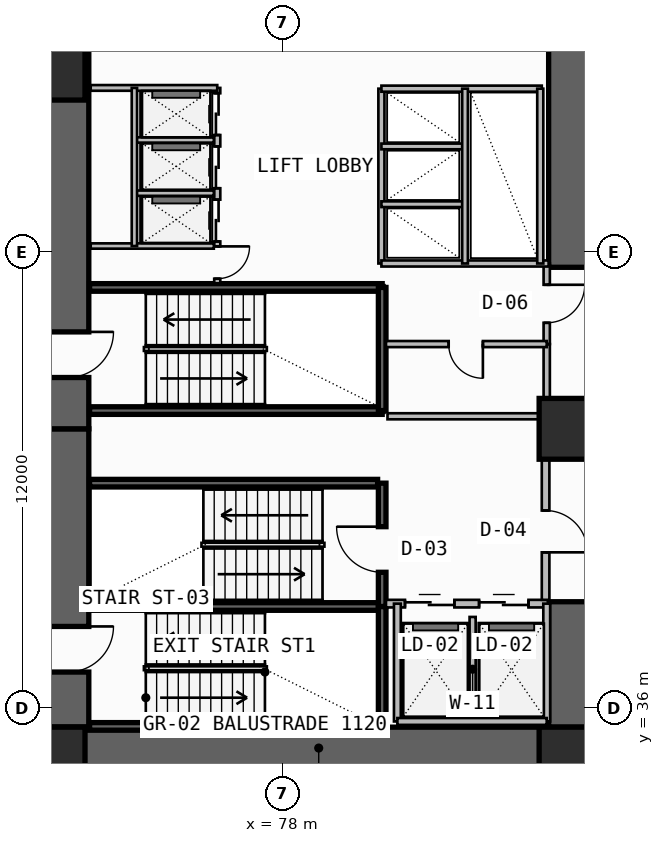
"""IFC4 building model, lengths in metres.
Left out: names, types, materials, properties, quantities, classifications, styles, units other than length and angle.
Written with IfcOpenShell. Run it as: python <this file> out.ifc"""

import sys

from ifc_helpers import new_model, si_unit, direction, frame, frame_2d, origin, origin_2d, place, context, subcontext, project, spatial, rectangle, extrude, element, fill, save


model = new_model("IFC4")
c1 = context("Model", 3, precision=1e-05, world=origin(), true_north=direction((0.0, 1.0)))
c2 = subcontext(c1, "Body", "Model", "MODEL_VIEW")
j1 = project(units=[si_unit("LENGTHUNIT", "METRE"), si_unit("PLANEANGLEUNIT", "RADIAN")], contexts=[c1])
p1 = place(None, origin())
s1 = spatial("IfcSite", under=j1, at=p1, CompositionType="ELEMENT")
p2 = place(p1, origin())
s2 = spatial("IfcBuilding", under=s1, at=p2, CompositionType="ELEMENT")
p3 = place(p2, frame((0.0, 0.0, 13.2)))
s3 = spatial("IfcBuildingStorey", under=s2, at=p3, CompositionType="ELEMENT", Elevation=13.2)
p4 = place(p3, frame((72.35, 35.5, -0.32), z_axis=(0.0, 0.0, 1.0), x_axis=(0.0, 1.0, 0.0)))
e1 = element("IfcWall", 1, at=p4, inside=s3, PredefinedType="SHEAR", context=c2, shape_type="SweptSolid", body=[
    extrude(rectangle(XDim=7.85, YDim=1.1, at=frame_2d((3.925, 0.0))), origin(), (0.0, 0.0, 1.0), 4.2),
])
p5 = place(p4, frame((1.45, 0.0, 0.32)))
e2 = element("IfcOpeningElement", 2, at=p5, cuts=e1, PredefinedType="OPENING", context=c2, shape_type="SweptSolid", body=[
    extrude(rectangle(XDim=1.2, YDim=2.2, at=frame_2d((0.6, 1.1))), frame((0.0, 0.56, 0.0), z_axis=(0.0, -1.0, 0.0), x_axis=(1.0, 0.0, 0.0)), (0.0, 0.0, 1.0), 1.12),
])
p6 = place(p3, frame((71.8, 34.95, -0.32), z_axis=(0.0, 0.0, 1.0), x_axis=(1.0, 0.0, 0.0)))
e3 = element("IfcWall", 3, at=p6, inside=s3, PredefinedType="SHEAR", context=c2, shape_type="SweptSolid", body=[
    extrude(rectangle(XDim=14.3, YDim=1.1, at=frame_2d((7.15, 0.0))), origin(), (0.0, 0.0, 1.0), 4.2),
])
p7 = place(p3, frame((85.55, 35.5, -0.32), z_axis=(0.0, 0.0, 1.0), x_axis=(0.0, 1.0, 0.0)))
e4 = element("IfcWall", 4, at=p7, inside=s3, PredefinedType="SHEAR", context=c2, shape_type="SweptSolid", body=[
    extrude(rectangle(XDim=3.3, YDim=1.1, at=frame_2d((1.65, 0.0))), origin(), (0.0, 0.0, 1.0), 4.2),
])
p8 = place(p3, frame((72.35, 43.35, -0.32), z_axis=(0.0, 0.0, 1.0), x_axis=(0.0, 1.0, 0.0)))
e5 = element("IfcWall", 5, at=p8, inside=s3, PredefinedType="SHEAR", context=c2, shape_type="SweptSolid", body=[
    extrude(rectangle(XDim=12.7, YDim=1.1, at=frame_2d((6.35, 0.0))), origin(), (0.0, 0.0, 1.0), 4.2),
])
p9 = place(p8, frame((1.35, 0.0, 0.32)))
e6 = element("IfcOpeningElement", 6, at=p9, cuts=e5, PredefinedType="OPENING", context=c2, shape_type="SweptSolid", body=[
    extrude(rectangle(XDim=1.2, YDim=2.2, at=frame_2d((0.6, 1.1))), frame((0.0, 0.56, 0.0), z_axis=(0.0, -1.0, 0.0), x_axis=(1.0, 0.0, 0.0)), (0.0, 0.0, 1.0), 1.12),
])
p10 = place(p3, frame((85.55, 47.6, -0.32), z_axis=(0.0, 0.0, 1.0), x_axis=(0.0, 1.0, 0.0)))
e7 = element("IfcWall", 7, at=p10, inside=s3, PredefinedType="SHEAR", context=c2, shape_type="SweptSolid", body=[
    extrude(rectangle(XDim=8.45, YDim=1.1, at=frame_2d((4.225, 0.0))), origin(), (0.0, 0.0, 1.0), 4.2),
])
for number, where, z_axis, x_axis in (
    (8, (72.0, 34.7, 0.0), (0.0, 0.0, 1.0), (1.0, 0.0, 0.0)),
    (9, (85.55, 34.7, 0.0), (0.0, 0.0, 1.0), (1.0, 0.0, 0.0)),
    (10, (85.55, 43.35, 0.0), (0.0, 0.0, 1.0), (1.0, 0.0, 0.0)),
    (11, (72.0, 52.8, 0.0), (0.0, 0.0, 1.0), (1.0, 0.0, 0.0)),
):
    element("IfcColumn", number, at=place(p3, frame(where, z_axis=z_axis, x_axis=x_axis)), inside=s3, PredefinedType="COLUMN", context=c2, shape_type="SweptSolid", body=[
        extrude(rectangle(XDim=1.6, YDim=1.6, at=origin_2d()), origin(), (0.0, 0.0, 1.0), 4.2),
    ])
for number, where, z_axis, x_axis in (
    (12, (72.92, 35.52, -0.32), (0.0, 0.0, 1.0), (1.0, 0.0, 0.0)),
    (13, (72.92, 38.675, -0.32), (0.0, 0.0, 1.0), (1.0, 0.0, 0.0)),
):
    element("IfcWall", number, at=place(p3, frame(where, z_axis=z_axis, x_axis=x_axis)), inside=s3, PredefinedType="SOLIDWALL", context=c2, shape_type="SweptSolid", body=[
        extrude(rectangle(XDim=7.7, YDim=0.2, at=frame_2d((3.85, 0.0))), origin(), (0.0, 0.0, 1.0), 4.2),
    ])
p11 = place(p3, frame((80.62, 35.52, -0.32), z_axis=(0.0, 0.0, 1.0), x_axis=(0.0, 1.0, 0.0)))
e14 = element("IfcWall", 14, at=p11, inside=s3, PredefinedType="SOLIDWALL", context=c2, shape_type="SweptSolid", body=[
    extrude(rectangle(XDim=3.155, YDim=0.2, at=frame_2d((1.578, 0.0))), origin(), (0.0, 0.0, 1.0), 4.2),
])
p12 = place(p3, frame((80.62, 38.675, -0.32), z_axis=(0.0, 0.0, 1.0), x_axis=(0.0, 1.0, 0.0)))
e15 = element("IfcWall", 15, at=p12, inside=s3, PredefinedType="SOLIDWALL", context=c2, shape_type="SweptSolid", body=[
    extrude(rectangle(XDim=3.245, YDim=0.2, at=frame_2d((1.623, 0.0))), origin(), (0.0, 0.0, 1.0), 4.2),
])
p13 = place(p12, frame((0.9, 0.0, 0.32)))
e16 = element("IfcOpeningElement", 16, at=p13, cuts=e15, PredefinedType="OPENING", context=c2, shape_type="SweptSolid", body=[
    extrude(rectangle(XDim=1.2, YDim=2.2, at=frame_2d((0.6, 1.1))), frame((0.0, 0.11, 0.0), z_axis=(0.0, -1.0, 0.0), x_axis=(1.0, 0.0, 0.0)), (0.0, 0.0, 1.0), 0.22),
])
p14 = place(p3, frame((80.72, 38.75, 0.0), z_axis=(0.0, 0.0, 1.0), x_axis=(1.0, 0.0, 0.0)))
e17 = element("IfcWall", 17, at=p14, inside=s3, PredefinedType="SOLIDWALL", context=c2, shape_type="SweptSolid", body=[
    extrude(rectangle(XDim=4.26, YDim=0.2, at=frame_2d((2.13, 0.0))), origin(), (0.0, 0.0, 1.0), 3.88),
])
p15 = place(p14, frame((0.5, 0.0, 0.0)))
e18 = element("IfcOpeningElement", 18, at=p15, cuts=e17, PredefinedType="OPENING", context=c2, shape_type="SweptSolid", body=[
    extrude(rectangle(XDim=1.3, YDim=2.3, at=frame_2d((0.65, 1.15))), frame((0.0, 0.11, 0.0), z_axis=(0.0, -1.0, 0.0), x_axis=(1.0, 0.0, 0.0)), (0.0, 0.0, 1.0), 0.22),
])
p16 = place(p14, frame((2.45, 0.0, 0.0)))
e19 = element("IfcOpeningElement", 19, at=p16, cuts=e17, PredefinedType="OPENING", context=c2, shape_type="SweptSolid", body=[
    extrude(rectangle(XDim=1.3, YDim=2.3, at=frame_2d((0.65, 1.15))), frame((0.0, 0.11, 0.0), z_axis=(0.0, -1.0, 0.0), x_axis=(1.0, 0.0, 0.0)), (0.0, 0.0, 1.0), 0.22),
])
p17 = place(p3, frame((83.0, 35.65, 0.0), z_axis=(0.0, 0.0, 1.0), x_axis=(0.0, 1.0, 0.0)))
e20 = element("IfcWall", 20, at=p17, inside=s3, PredefinedType="PLUMBINGWALL", context=c2, shape_type="SweptSolid", body=[
    extrude(rectangle(XDim=2.75, YDim=0.16, at=frame_2d((1.375, 0.0))), origin(), (0.0, 0.0, 1.0), 3.88),
])
for number, where, z_axis, x_axis in (
    (21, (84.95, 35.65, 0.0), (0.0, 0.0, 1.0), (0.0, 1.0, 0.0)),
    (22, (81.02, 35.65, 0.0), (0.0, 0.0, 1.0), (0.0, 1.0, 0.0)),
):
    element("IfcWall", number, at=place(p3, frame(where, z_axis=z_axis, x_axis=x_axis)), inside=s3, PredefinedType="SOLIDWALL", context=c2, shape_type="SweptSolid", body=[
        extrude(rectangle(XDim=3.1, YDim=0.18, at=frame_2d((1.55, 0.0))), origin(), (0.0, 0.0, 1.0), 3.88),
    ])
p18 = place(p3, frame((81.02, 35.65, 0.0), z_axis=(0.0, 0.0, 1.0), x_axis=(1.0, 0.0, 0.0)))
e23 = element("IfcWall", 23, at=p18, inside=s3, PredefinedType="SOLIDWALL", context=c2, shape_type="SweptSolid", body=[
    extrude(rectangle(XDim=3.93, YDim=0.18, at=frame_2d((1.965, 0.0))), origin(), (0.0, 0.0, 1.0), 3.88),
])
p19 = place(p3, frame((84.92, 38.85, 0.0), z_axis=(0.0, 0.0, 1.0), x_axis=(0.0, 1.0, 0.0)))
e24 = element("IfcWall", 24, at=p19, inside=s3, PredefinedType="SOLIDWALL", context=c2, shape_type="SweptSolid", body=[
    extrude(rectangle(XDim=4.83, YDim=0.2, at=frame_2d((2.415, 0.0))), origin(), (0.0, 0.0, 1.0), 3.88),
])
p20 = place(p19, frame((1.25, 0.0, 0.0)))
e25 = element("IfcOpeningElement", 25, at=p20, cuts=e24, PredefinedType="OPENING", context=c2, shape_type="SweptSolid", body=[
    extrude(rectangle(XDim=1.1, YDim=2.2, at=frame_2d((0.55, 1.1))), frame((0.0, 0.11, 0.0), z_axis=(0.0, -1.0, 0.0), x_axis=(1.0, 0.0, 0.0)), (0.0, 0.0, 1.0), 0.22),
])
p21 = place(p3, frame((72.92, 41.92, -0.32), z_axis=(0.0, 0.0, 1.0), x_axis=(1.0, 0.0, 0.0)))
e26 = element("IfcWall", 26, at=p21, inside=s3, PredefinedType="SOLIDWALL", context=c2, shape_type="SweptSolid", body=[
    extrude(rectangle(XDim=7.58, YDim=0.2, at=frame_2d((3.79, 0.0))), origin(), (0.0, 0.0, 1.0), 4.2),
])
for number, where, z_axis, x_axis in (
    (27, (72.92, 43.83, -0.32), (0.0, 0.0, 1.0), (1.0, 0.0, 0.0)),
    (28, (72.92, 47.07, -0.32), (0.0, 0.0, 1.0), (1.0, 0.0, 0.0)),
):
    element("IfcWall", number, at=place(p3, frame(where, z_axis=z_axis, x_axis=x_axis)), inside=s3, PredefinedType="SOLIDWALL", context=c2, shape_type="SweptSolid", body=[
        extrude(rectangle(XDim=7.7, YDim=0.2, at=frame_2d((3.85, 0.0))), origin(), (0.0, 0.0, 1.0), 4.2),
    ])
p22 = place(p3, frame((80.62, 43.83, -0.32), z_axis=(0.0, 0.0, 1.0), x_axis=(0.0, 1.0, 0.0)))
e29 = element("IfcWall", 29, at=p22, inside=s3, PredefinedType="SOLIDWALL", context=c2, shape_type="SweptSolid", body=[
    extrude(rectangle(XDim=3.24, YDim=0.2, at=frame_2d((1.62, 0.0))), origin(), (0.0, 0.0, 1.0), 4.2),
])
p23 = place(p3, frame((84.95, 43.68, 0.0), z_axis=(0.0, 0.0, 1.0), x_axis=(0.0, 1.0, 0.0)))
e30 = element("IfcWall", 30, at=p23, inside=s3, PredefinedType="PLUMBINGWALL", context=c2, shape_type="SweptSolid", body=[
    extrude(rectangle(XDim=1.9, YDim=0.165, at=frame_2d((0.95, 0.0))), origin(), (0.0, 0.0, 1.0), 3.88),
])
p24 = place(p3, frame((84.95, 45.58, 0.0), z_axis=(0.0, 0.0, 1.0), x_axis=(0.0, 1.0, 0.0)))
e31 = element("IfcWall", 31, at=p24, inside=s3, PredefinedType="PARTITIONING", context=c2, shape_type="SweptSolid", body=[
    extrude(rectangle(XDim=2.12, YDim=0.165, at=frame_2d((1.06, 0.0))), origin(), (0.0, 0.0, 1.0), 3.88),
])
p25 = place(p24, frame((0.56, 0.0, 0.0)))
e32 = element("IfcOpeningElement", 32, at=p25, cuts=e31, PredefinedType="OPENING", context=c2, shape_type="SweptSolid", body=[
    extrude(rectangle(XDim=1.0, YDim=2.2, at=frame_2d((0.5, 1.1))), frame((0.0, 0.093, 0.0), z_axis=(0.0, -1.0, 0.0), x_axis=(1.0, 0.0, 0.0)), (0.0, 0.0, 1.0), 0.185),
])
p26 = place(p3, frame((80.72, 45.58, 0.0), z_axis=(0.0, 0.0, 1.0), x_axis=(1.0, 0.0, 0.0)))
e33 = element("IfcWall", 33, at=p26, inside=s3, PredefinedType="PLUMBINGWALL", context=c2, shape_type="SweptSolid", body=[
    extrude(rectangle(XDim=4.23, YDim=0.16, at=frame_2d((2.115, 0.0))), origin(), (0.0, 0.0, 1.0), 3.88),
])
p27 = place(p26, frame((1.65, 0.0, 0.0)))
e34 = element("IfcOpeningElement", 34, at=p27, cuts=e33, PredefinedType="OPENING", context=c2, shape_type="SweptSolid", body=[
    extrude(rectangle(XDim=0.9, YDim=2.1, at=frame_2d((0.45, 1.05))), frame((0.0, 0.09, 0.0), z_axis=(0.0, -1.0, 0.0), x_axis=(1.0, 0.0, 0.0)), (0.0, 0.0, 1.0), 0.18),
])
p28 = place(p3, frame((80.76, 43.68, 0.0), z_axis=(0.0, 0.0, 1.0), x_axis=(1.0, 0.0, 0.0)))
e35 = element("IfcWall", 35, at=p28, inside=s3, PredefinedType="PLUMBINGWALL", context=c2, shape_type="SweptSolid", body=[
    extrude(rectangle(XDim=4.19, YDim=0.16, at=frame_2d((2.095, 0.0))), origin(), (0.0, 0.0, 1.0), 3.88),
])
p29 = place(p3, frame((76.28, 47.18, 0.0), z_axis=(0.0, 0.0, 1.0), x_axis=(0.0, 1.0, 0.0)))
e36 = element("IfcWall", 36, at=p29, inside=s3, PredefinedType="SOLIDWALL", context=c2, shape_type="SweptSolid", body=[
    extrude(rectangle(XDim=5.14, YDim=0.16, at=frame_2d((2.57, 0.0))), origin(), (0.0, 0.0, 1.0), 3.88),
])
p30 = place(p29, frame((1.1, 0.0, 0.0)))
e37 = element("IfcOpeningElement", 37, at=p30, cuts=e36, PredefinedType="OPENING", context=c2, shape_type="SweptSolid", body=[
    extrude(rectangle(XDim=1.1, YDim=2.25, at=frame_2d((0.55, 1.125))), frame((0.0, 0.09, 0.0), z_axis=(0.0, -1.0, 0.0), x_axis=(1.0, 0.0, 0.0)), (0.0, 0.0, 1.0), 0.18),
])
p31 = place(p29, frame((2.5, 0.0, 0.0)))
e38 = element("IfcOpeningElement", 38, at=p31, cuts=e36, PredefinedType="OPENING", context=c2, shape_type="SweptSolid", body=[
    extrude(rectangle(XDim=1.1, YDim=2.25, at=frame_2d((0.55, 1.125))), frame((0.0, 0.09, 0.0), z_axis=(0.0, -1.0, 0.0), x_axis=(1.0, 0.0, 0.0)), (0.0, 0.0, 1.0), 0.18),
])
p32 = place(p29, frame((3.9, 0.0, 0.0)))
e39 = element("IfcOpeningElement", 39, at=p32, cuts=e36, PredefinedType="OPENING", context=c2, shape_type="SweptSolid", body=[
    extrude(rectangle(XDim=1.1, YDim=2.25, at=frame_2d((0.55, 1.125))), frame((0.0, 0.09, 0.0), z_axis=(0.0, -1.0, 0.0), x_axis=(1.0, 0.0, 0.0)), (0.0, 0.0, 1.0), 0.18),
])
p33 = place(p29, frame((0.12, 0.0, 0.0)))
e40 = element("IfcOpeningElement", 40, at=p33, cuts=e36, PredefinedType="OPENING", context=c2, shape_type="SweptSolid", body=[
    extrude(rectangle(XDim=0.85, YDim=2.05, at=frame_2d((0.425, 1.025))), frame((0.0, 0.09, 0.0), z_axis=(0.0, -1.0, 0.0), x_axis=(1.0, 0.0, 0.0)), (0.0, 0.0, 1.0), 0.18),
])
p34 = place(p3, frame((72.95, 52.32, 0.0), z_axis=(0.0, 0.0, 1.0), x_axis=(1.0, 0.0, 0.0)))
e41 = element("IfcWall", 41, at=p34, inside=s3, PredefinedType="SOLIDWALL", context=c2, shape_type="SweptSolid", body=[
    extrude(rectangle(XDim=3.33, YDim=0.15, at=frame_2d((1.665, 0.0))), origin(), (0.0, 0.0, 1.0), 3.88),
])
p35 = place(p3, frame((72.95, 48.16, 0.0), z_axis=(0.0, 0.0, 1.0), x_axis=(1.0, 0.0, 0.0)))
e42 = element("IfcWall", 42, at=p35, inside=s3, PredefinedType="PLUMBINGWALL", context=c2, shape_type="SweptSolid", body=[
    extrude(rectangle(XDim=3.24, YDim=0.14, at=frame_2d((1.62, 0.0))), origin(), (0.0, 0.0, 1.0), 3.88),
])
for number, where, z_axis, x_axis in (
    (43, (74.15, 49.55, 0.0), (0.0, 0.0, 1.0), (1.0, 0.0, 0.0)),
    (44, (74.15, 50.95, 0.0), (0.0, 0.0, 1.0), (1.0, 0.0, 0.0)),
):
    element("IfcWall", number, at=place(p3, frame(where, z_axis=z_axis, x_axis=x_axis)), inside=s3, PredefinedType="PLUMBINGWALL", context=c2, shape_type="SweptSolid", body=[
        extrude(rectangle(XDim=2.04, YDim=0.14, at=frame_2d((1.02, 0.0))), origin(), (0.0, 0.0, 1.0), 3.88),
    ])
p36 = place(p3, frame((74.1, 48.16, 0.0), z_axis=(0.0, 0.0, 1.0), x_axis=(0.0, 1.0, 0.0)))
e45 = element("IfcWall", 45, at=p36, inside=s3, PredefinedType="PLUMBINGWALL", context=c2, shape_type="SweptSolid", body=[
    extrude(rectangle(XDim=4.16, YDim=0.14, at=frame_2d((2.08, 0.0))), origin(), (0.0, 0.0, 1.0), 3.88),
])
p37 = place(p3, frame((80.6, 47.7, 0.0), z_axis=(0.0, 0.0, 1.0), x_axis=(0.0, 1.0, 0.0)))
e46 = element("IfcWall", 46, at=p37, inside=s3, PredefinedType="SOLIDWALL", context=c2, shape_type="SweptSolid", body=[
    extrude(rectangle(XDim=4.6, YDim=0.16, at=frame_2d((2.3, 0.0))), origin(), (0.0, 0.0, 1.0), 3.88),
])
p38 = place(p3, frame((80.6, 47.7, 0.0), z_axis=(0.0, 0.0, 1.0), x_axis=(1.0, 0.0, 0.0)))
e47 = element("IfcWall", 47, at=p38, inside=s3, PredefinedType="SOLIDWALL", context=c2, shape_type="SweptSolid", body=[
    extrude(rectangle(XDim=4.4, YDim=0.16, at=frame_2d((2.2, 0.0))), origin(), (0.0, 0.0, 1.0), 3.88),
])
p39 = place(p3, frame((80.6, 52.3, 0.0), z_axis=(0.0, 0.0, 1.0), x_axis=(1.0, 0.0, 0.0)))
e48 = element("IfcWall", 48, at=p39, inside=s3, PredefinedType="SOLIDWALL", context=c2, shape_type="SweptSolid", body=[
    extrude(rectangle(XDim=4.22, YDim=0.16, at=frame_2d((2.11, 0.0))), origin(), (0.0, 0.0, 1.0), 3.88),
])
for number, where, z_axis, x_axis in (
    (49, (80.6, 49.26, 0.0), (0.0, 0.0, 1.0), (1.0, 0.0, 0.0)),
    (50, (80.6, 50.78, 0.0), (0.0, 0.0, 1.0), (1.0, 0.0, 0.0)),
):
    element("IfcWall", number, at=place(p3, frame(where, z_axis=z_axis, x_axis=x_axis)), inside=s3, PredefinedType="PLUMBINGWALL", context=c2, shape_type="SweptSolid", body=[
        extrude(rectangle(XDim=2.2, YDim=0.15, at=frame_2d((1.1, 0.0))), origin(), (0.0, 0.0, 1.0), 3.88),
    ])
p40 = place(p3, frame((82.8, 47.7, 0.0), z_axis=(0.0, 0.0, 1.0), x_axis=(0.0, 1.0, 0.0)))
e51 = element("IfcWall", 51, at=p40, inside=s3, PredefinedType="PLUMBINGWALL", context=c2, shape_type="SweptSolid", body=[
    extrude(rectangle(XDim=4.6, YDim=0.15, at=frame_2d((2.3, 0.0))), origin(), (0.0, 0.0, 1.0), 3.88),
])
p41 = place(p3, frame((84.78, 47.7, 0.0), z_axis=(0.0, 0.0, 1.0), x_axis=(0.0, 1.0, 0.0)))
e52 = element("IfcWall", 52, at=p41, inside=s3, PredefinedType="SOLIDWALL", context=c2, shape_type="SweptSolid", body=[
    extrude(rectangle(XDim=4.6, YDim=0.16, at=frame_2d((2.3, 0.0))), origin(), (0.0, 0.0, 1.0), 3.88),
])
p42 = place(p5, frame((1.2, 0.0, 0.0), z_axis=(0.0, 0.0, 1.0), x_axis=(-1.0, 0.0, 0.0)))
e53 = element("IfcDoor", 53, at=p42, inside=s3, OperationType="SINGLE_SWING_LEFT", PredefinedType="USERDEFINED", context=c2, shape_type="SweptSolid", body=[
    extrude(rectangle(XDim=1.2, YDim=2.2, at=frame_2d((0.6, 1.1))), frame((0.0, 0.025, 0.0), z_axis=(0.0, -1.0, 0.0), x_axis=(1.0, 0.0, 0.0)), (0.0, 0.0, 1.0), 0.05),
])
fill(e2, e53)
p43 = place(p13, origin())
e54 = element("IfcDoor", 54, at=p43, inside=s3, OperationType="SINGLE_SWING_RIGHT", PredefinedType="USERDEFINED", context=c2, shape_type="SweptSolid", body=[
    extrude(rectangle(XDim=1.2, YDim=2.2, at=frame_2d((0.6, 1.1))), frame((0.0, 0.025, 0.0), z_axis=(0.0, -1.0, 0.0), x_axis=(1.0, 0.0, 0.0)), (0.0, 0.0, 1.0), 0.05),
])
fill(e16, e54)
p44 = place(p15, origin())
e55 = element("IfcDoor", 55, at=p44, inside=s3, OperationType="DOUBLE_DOOR_SLIDING", PredefinedType="DOOR", context=c2, shape_type="SweptSolid", body=[
    extrude(rectangle(XDim=1.3, YDim=2.3, at=frame_2d((0.65, 1.15))), frame((0.0, 0.025, 0.0), z_axis=(0.0, -1.0, 0.0), x_axis=(1.0, 0.0, 0.0)), (0.0, 0.0, 1.0), 0.05),
])
fill(e18, e55)
p45 = place(p16, origin())
e56 = element("IfcDoor", 56, at=p45, inside=s3, OperationType="DOUBLE_DOOR_SLIDING", PredefinedType="DOOR", context=c2, shape_type="SweptSolid", body=[
    extrude(rectangle(XDim=1.3, YDim=2.3, at=frame_2d((0.65, 1.15))), frame((0.0, 0.025, 0.0), z_axis=(0.0, -1.0, 0.0), x_axis=(1.0, 0.0, 0.0)), (0.0, 0.0, 1.0), 0.05),
])
fill(e19, e56)
p46 = place(p20, frame((1.1, 0.0, 0.0), z_axis=(0.0, 0.0, 1.0), x_axis=(-1.0, 0.0, 0.0)))
e57 = element("IfcDoor", 57, at=p46, inside=s3, OperationType="SINGLE_SWING_RIGHT", PredefinedType="DOOR", context=c2, shape_type="SweptSolid", body=[
    extrude(rectangle(XDim=1.1, YDim=2.2, at=frame_2d((0.55, 1.1))), frame((0.0, 0.025, 0.0), z_axis=(0.0, -1.0, 0.0), x_axis=(1.0, 0.0, 0.0)), (0.0, 0.0, 1.0), 0.05),
])
fill(e25, e57)
p47 = place(p9, frame((1.2, 0.0, 0.0), z_axis=(0.0, 0.0, 1.0), x_axis=(-1.0, 0.0, 0.0)))
e58 = element("IfcDoor", 58, at=p47, inside=s3, OperationType="SINGLE_SWING_LEFT", PredefinedType="USERDEFINED", context=c2, shape_type="SweptSolid", body=[
    extrude(rectangle(XDim=1.2, YDim=2.2, at=frame_2d((0.6, 1.1))), frame((0.0, 0.025, 0.0), z_axis=(0.0, -1.0, 0.0), x_axis=(1.0, 0.0, 0.0)), (0.0, 0.0, 1.0), 0.05),
])
fill(e6, e58)
p48 = place(p25, frame((1.0, 0.0, 0.0), z_axis=(0.0, 0.0, 1.0), x_axis=(-1.0, 0.0, 0.0)))
e59 = element("IfcDoor", 59, at=p48, inside=s3, OperationType="SINGLE_SWING_LEFT", PredefinedType="DOOR", context=c2, shape_type="SweptSolid", body=[
    extrude(rectangle(XDim=1.0, YDim=2.2, at=frame_2d((0.5, 1.1))), frame((0.0, 0.025, 0.0), z_axis=(0.0, -1.0, 0.0), x_axis=(1.0, 0.0, 0.0)), (0.0, 0.0, 1.0), 0.05),
])
fill(e32, e59)
p49 = place(p27, frame((0.9, 0.0, 0.0), z_axis=(0.0, 0.0, 1.0), x_axis=(-1.0, 0.0, 0.0)))
e60 = element("IfcDoor", 60, at=p49, inside=s3, OperationType="SINGLE_SWING_LEFT", PredefinedType="DOOR", context=c2, shape_type="SweptSolid", body=[
    extrude(rectangle(XDim=0.9, YDim=2.1, at=frame_2d((0.45, 1.05))), frame((0.0, 0.025, 0.0), z_axis=(0.0, -1.0, 0.0), x_axis=(1.0, 0.0, 0.0)), (0.0, 0.0, 1.0), 0.05),
])
fill(e34, e60)
p50 = place(p30, origin())
e61 = element("IfcDoor", 61, at=p50, inside=s3, OperationType="DOUBLE_DOOR_SLIDING", PredefinedType="DOOR", context=c2, shape_type="SweptSolid", body=[
    extrude(rectangle(XDim=1.1, YDim=2.25, at=frame_2d((0.55, 1.125))), frame((0.0, 0.025, 0.0), z_axis=(0.0, -1.0, 0.0), x_axis=(1.0, 0.0, 0.0)), (0.0, 0.0, 1.0), 0.05),
])
fill(e37, e61)
p51 = place(p31, origin())
e62 = element("IfcDoor", 62, at=p51, inside=s3, OperationType="DOUBLE_DOOR_SLIDING", PredefinedType="DOOR", context=c2, shape_type="SweptSolid", body=[
    extrude(rectangle(XDim=1.1, YDim=2.25, at=frame_2d((0.55, 1.125))), frame((0.0, 0.025, 0.0), z_axis=(0.0, -1.0, 0.0), x_axis=(1.0, 0.0, 0.0)), (0.0, 0.0, 1.0), 0.05),
])
fill(e38, e62)
p52 = place(p32, origin())
e63 = element("IfcDoor", 63, at=p52, inside=s3, OperationType="DOUBLE_DOOR_SLIDING", PredefinedType="DOOR", context=c2, shape_type="SweptSolid", body=[
    extrude(rectangle(XDim=1.1, YDim=2.25, at=frame_2d((0.55, 1.125))), frame((0.0, 0.025, 0.0), z_axis=(0.0, -1.0, 0.0), x_axis=(1.0, 0.0, 0.0)), (0.0, 0.0, 1.0), 0.05),
])
fill(e39, e63)
p53 = place(p33, frame((0.85, 0.0, 0.0), z_axis=(0.0, 0.0, 1.0), x_axis=(-1.0, 0.0, 0.0)))
e64 = element("IfcDoor", 64, at=p53, inside=s3, OperationType="SINGLE_SWING_LEFT", PredefinedType="DOOR", context=c2, shape_type="SweptSolid", body=[
    extrude(rectangle(XDim=0.85, YDim=2.05, at=frame_2d((0.425, 1.025))), frame((0.0, 0.025, 0.0), z_axis=(0.0, -1.0, 0.0), x_axis=(1.0, 0.0, 0.0)), (0.0, 0.0, 1.0), 0.05),
])
fill(e40, e64)
save(model, sys.argv[1])
